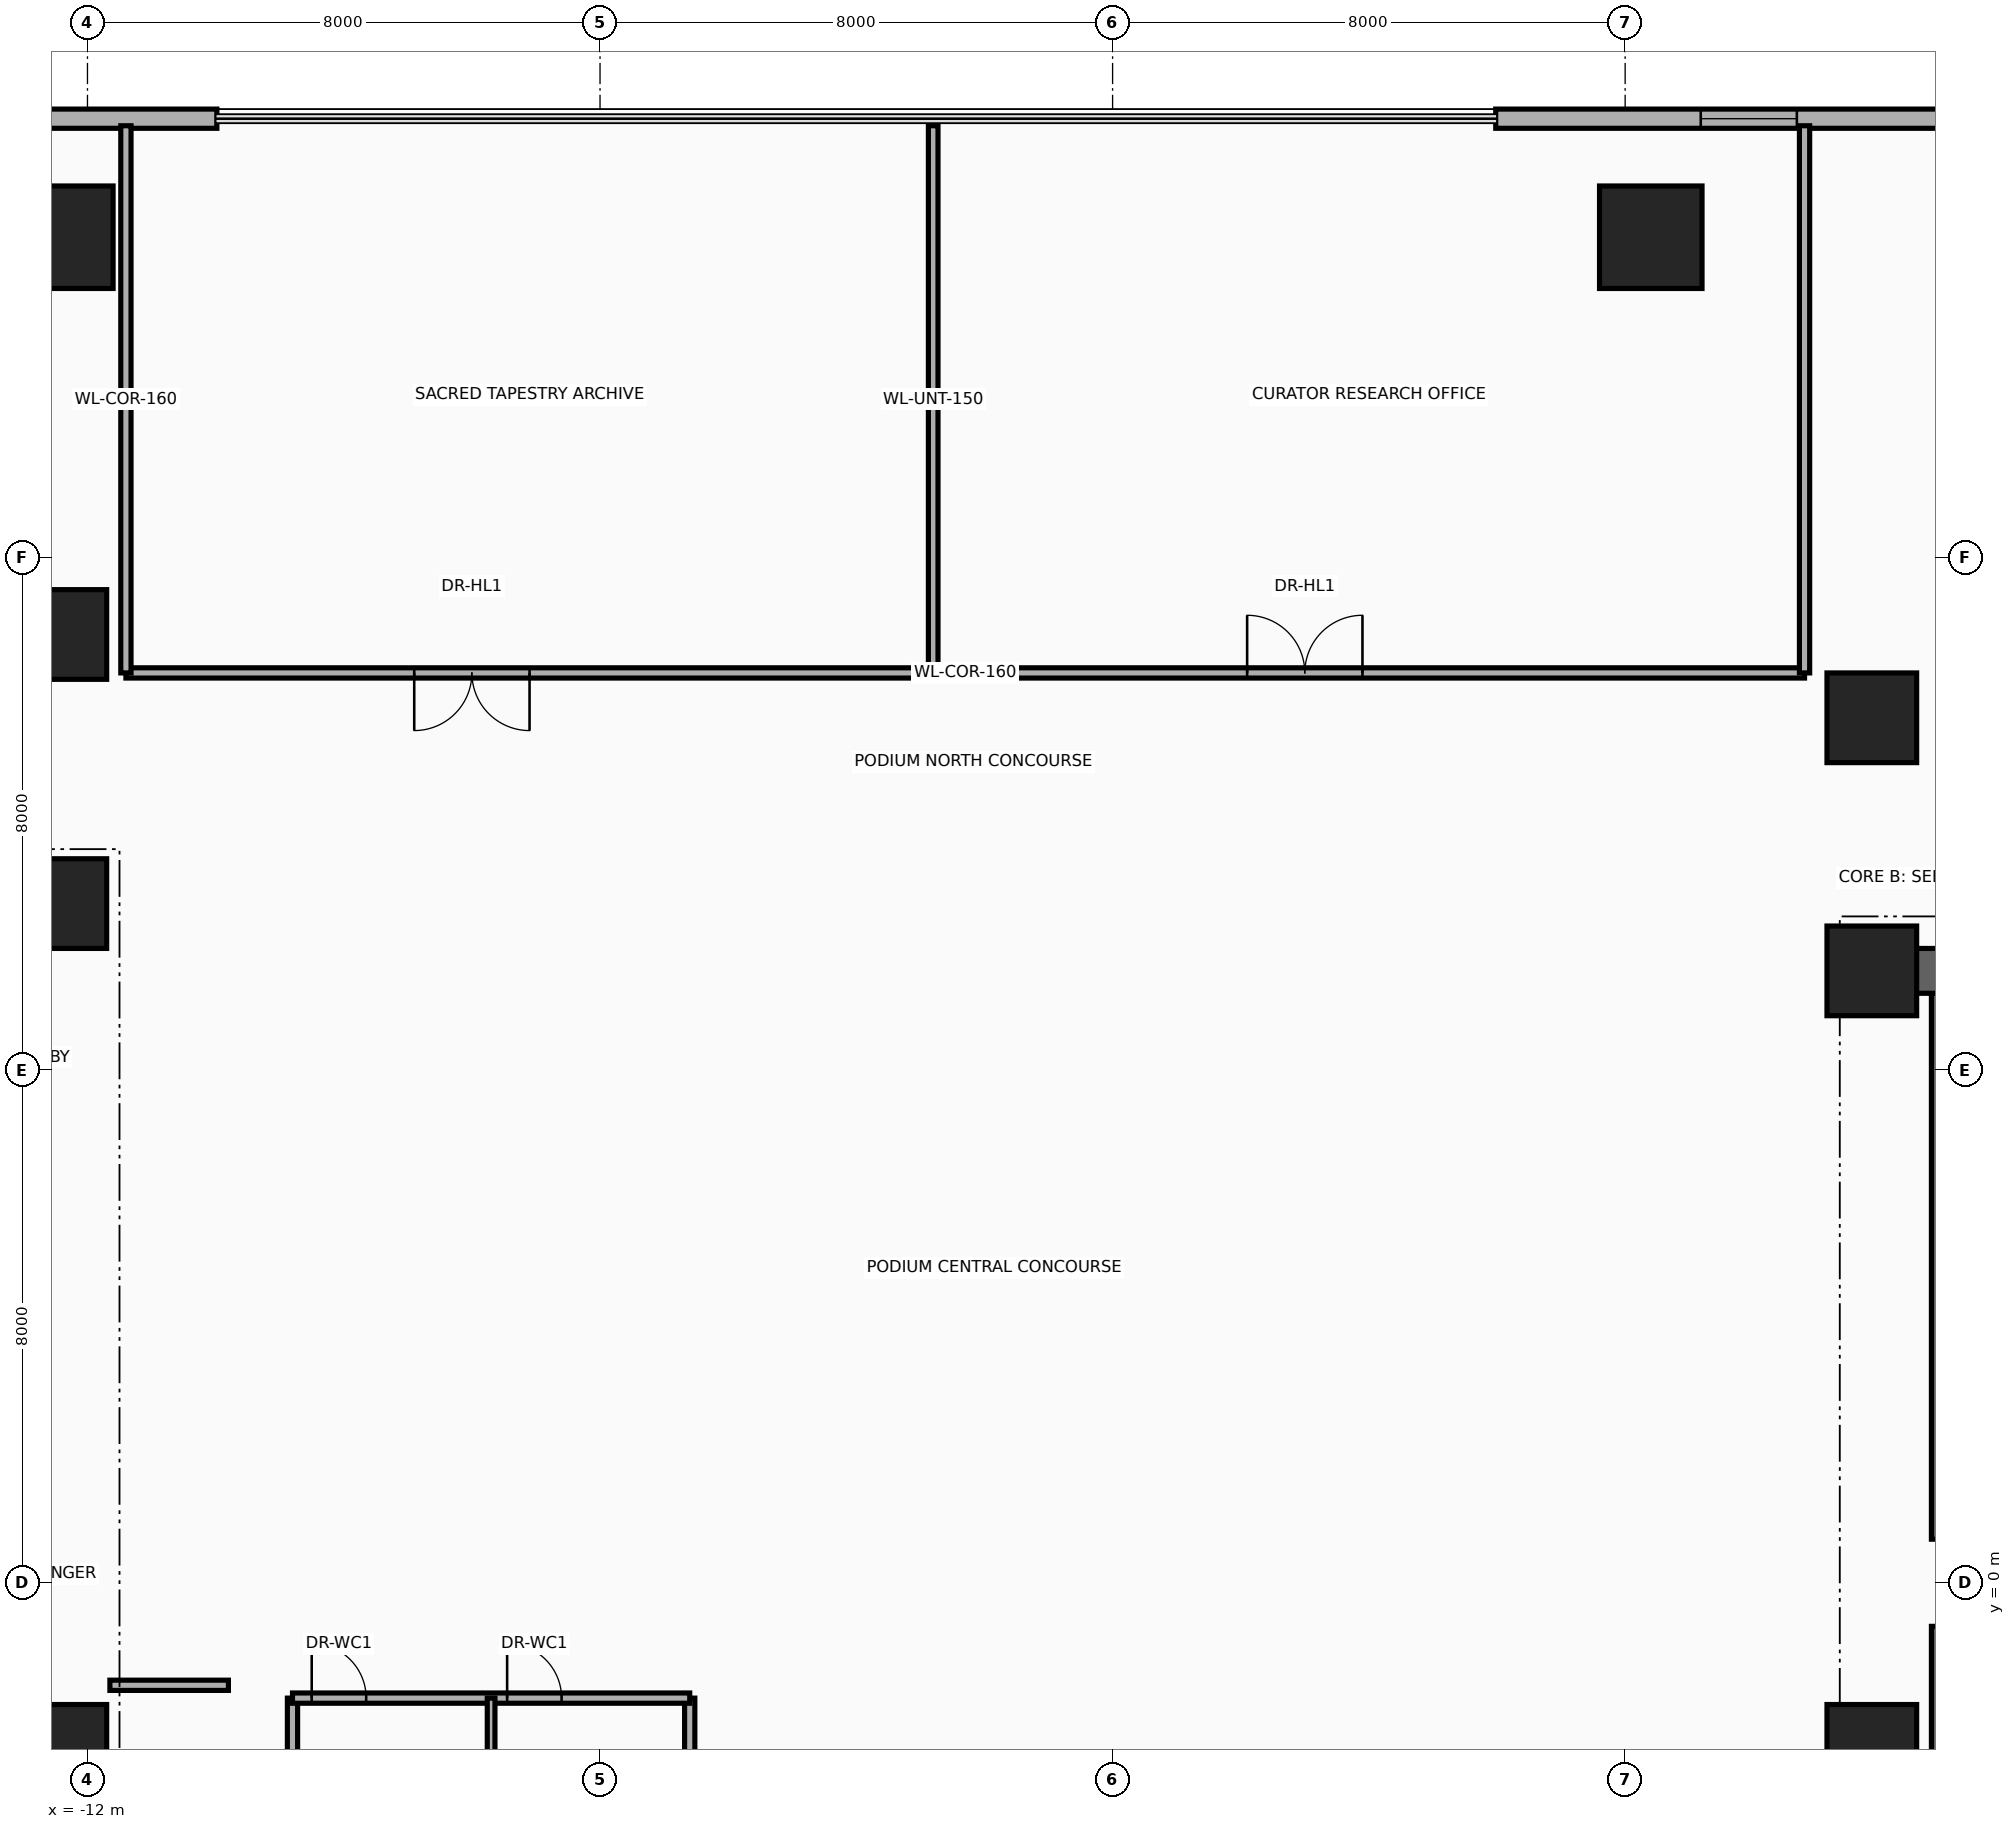
"""IFC4 building model, lengths in metres.
Left out: names, types, materials, properties, quantities, classifications, styles, units other than length and angle.
Written with IfcOpenShell. Run it as: python <this file> out.ifc"""

import sys

from ifc_helpers import new_model, si_unit, direction, frame, frame_2d, origin, origin_2d, place, context, subcontext, project, spatial, rectangle, extrude, source, transform, mapped, element, fill, save


model = new_model("IFC4")
c1 = context("Model", 3, precision=1e-05, world=origin(), true_north=direction((0.0, 1.0)))
c2 = subcontext(c1, "Body", "Model", "MODEL_VIEW")
j1 = project(units=[si_unit("LENGTHUNIT", "METRE"), si_unit("PLANEANGLEUNIT", "RADIAN")], contexts=[c1])
p1 = place(None, origin())
s1 = spatial("IfcSite", under=j1, at=p1, CompositionType="ELEMENT")
p2 = place(p1, origin())
s2 = spatial("IfcBuilding", under=s1, at=p2, CompositionType="ELEMENT")
p3 = place(p2, frame((0.0, 0.0, 15.6)))
s3 = spatial("IfcBuildingStorey", under=s2, at=p3, CompositionType="ELEMENT", Elevation=15.6)
for number, where, z_axis, x_axis in (
    (1, (16.89, 0.68, 0.0), (0.0, 0.0, 1.0), (0.0, 1.0, 0.0)),
    (2, (16.89, -9.2, 0.0), (0.0, 0.0, 1.0), (0.0, 1.0, 0.0)),
):
    element("IfcWall", number, at=place(p3, frame(where, z_axis=z_axis, x_axis=x_axis)), inside=s3, PredefinedType="SHEAR", context=c2, shape_type="SweptSolid", body=[
        extrude(rectangle(XDim=8.52, YDim=0.22, at=frame_2d((4.26, 0.0))), origin(), (0.0, 0.0, 1.0), 4.8),
    ])
p4 = place(p3, frame((-22.65, 10.8, 0.0), z_axis=(0.0, 0.0, 1.0), x_axis=(1.0, 0.0, 0.0)))
e3 = element("IfcWall", 3, at=p4, inside=s3, PredefinedType="SHEAR", context=c2, shape_type="SweptSolid", body=[
    extrude(rectangle(XDim=10.25, YDim=0.7, at=frame_2d((5.125, 0.0))), origin(), (0.0, 0.0, 1.0), 4.8),
])
p5 = place(p3, frame((15.85, 9.55, 0.0), z_axis=(0.0, 0.0, 1.0), x_axis=(1.0, 0.0, 0.0)))
e4 = element("IfcWall", 4, at=p5, inside=s3, PredefinedType="SHEAR", context=c2, shape_type="SweptSolid", body=[
    extrude(rectangle(XDim=9.0, YDim=0.7, at=frame_2d((4.5, 0.0))), origin(), (0.0, 0.0, 1.0), 4.8),
])
m1 = source(origin(), c2, "Body", "SweptSolid", [
    extrude(rectangle(XDim=1.4, YDim=1.4, at=origin_2d()), origin(), (0.0, 0.0, 1.0), 5.2),
])
for number, where, z_axis, x_axis in (
    (5, (-12.4, -2.6, 0.0), (0.0, 0.0, 1.0), (1.0, 0.0, 0.0)),
    (6, (-12.4, 10.6, 0.0), (0.0, 0.0, 1.0), (1.0, 0.0, 0.0)),
    (7, (-12.4, 14.8, 0.0), (0.0, 0.0, 1.0), (1.0, 0.0, 0.0)),
    (8, (15.85, -2.6, 0.0), (0.0, 0.0, 1.0), (1.0, 0.0, 0.0)),
    (9, (15.85, 9.55, 0.0), (0.0, 0.0, 1.0), (1.0, 0.0, 0.0)),
    (10, (15.85, 13.5, 0.0), (0.0, 0.0, 1.0), (1.0, 0.0, 0.0)),
):
    element("IfcColumn", number, at=place(p3, frame(where, z_axis=z_axis, x_axis=x_axis)), inside=s3, PredefinedType="COLUMN", context=c2, shape_type="MappedRepresentation", body=[
        mapped(m1, transform((0.0, 0.0, 0.0), x_axis=(1.0, 0.0, 0.0), y_axis=(0.0, 1.0, 0.0), z_axis=(0.0, 0.0, 1.0), scale=1.0)),
    ])
m2 = source(origin(), c2, "Body", "SweptSolid", [
    extrude(rectangle(XDim=1.6, YDim=1.6, at=origin_2d()), origin(), (0.0, 0.0, 1.0), 5.2),
])
for number, where, z_axis, x_axis in (
    (11, (-12.4, 21.0, 0.0), (0.0, 0.0, 1.0), (1.0, 0.0, 0.0)),
    (12, (12.4, 21.0, 0.0), (0.0, 0.0, 1.0), (1.0, 0.0, 0.0)),
):
    element("IfcColumn", number, at=place(p3, frame(where, z_axis=z_axis, x_axis=x_axis)), inside=s3, PredefinedType="COLUMN", context=c2, shape_type="MappedRepresentation", body=[
        mapped(m2, transform((0.0, 0.0, 0.0), x_axis=(1.0, 0.0, 0.0), y_axis=(0.0, 1.0, 0.0), z_axis=(0.0, 0.0, 1.0), scale=1.0)),
    ])
p6 = place(p3, frame((-33.85, 22.85, 0.0), z_axis=(0.0, 0.0, 1.0), x_axis=(1.0, 0.0, 0.0)))
e13 = element("IfcWall", 13, at=p6, inside=s3, PredefinedType="SOLIDWALL", context=c2, shape_type="SweptSolid", body=[
    extrude(rectangle(XDim=23.87, YDim=0.3, at=frame_2d((11.935, 0.0))), origin(), (0.0, 0.0, 1.0), 4.8),
])
p7 = place(p6, frame((3.2, 0.0, 0.9)))
e14 = element("IfcOpeningElement", 14, at=p7, cuts=e13, PredefinedType="OPENING", context=c2, shape_type="SweptSolid", body=[
    extrude(rectangle(XDim=1.5, YDim=1.75, at=frame_2d((0.75, 0.875))), frame((0.0, 0.165, 0.0), z_axis=(0.0, -1.0, 0.0), x_axis=(1.0, 0.0, 0.0)), (0.0, 0.0, 1.0), 0.33),
])
p8 = place(p6, frame((10.0, 0.0, 0.9)))
e15 = element("IfcOpeningElement", 15, at=p8, cuts=e13, PredefinedType="OPENING", context=c2, shape_type="SweptSolid", body=[
    extrude(rectangle(XDim=1.5, YDim=1.75, at=frame_2d((0.75, 0.875))), frame((0.0, 0.165, 0.0), z_axis=(0.0, -1.0, 0.0), x_axis=(1.0, 0.0, 0.0)), (0.0, 0.0, 1.0), 0.33),
])
p9 = place(p6, frame((17.8, 0.0, 0.9)))
e16 = element("IfcOpeningElement", 16, at=p9, cuts=e13, PredefinedType="OPENING", context=c2, shape_type="SweptSolid", body=[
    extrude(rectangle(XDim=1.5, YDim=1.75, at=frame_2d((0.75, 0.875))), frame((0.0, 0.165, 0.0), z_axis=(0.0, -1.0, 0.0), x_axis=(1.0, 0.0, 0.0)), (0.0, 0.0, 1.0), 0.33),
])
p10 = place(p3, frame((9.98, 22.85, 0.0), z_axis=(0.0, 0.0, 1.0), x_axis=(1.0, 0.0, 0.0)))
e17 = element("IfcWall", 17, at=p10, inside=s3, PredefinedType="SOLIDWALL", context=c2, shape_type="SweptSolid", body=[
    extrude(rectangle(XDim=23.87, YDim=0.3, at=frame_2d((11.935, 0.0))), origin(), (0.0, 0.0, 1.0), 4.8),
])
p11 = place(p10, frame((3.2, 0.0, 0.9)))
e18 = element("IfcOpeningElement", 18, at=p11, cuts=e17, PredefinedType="OPENING", context=c2, shape_type="SweptSolid", body=[
    extrude(rectangle(XDim=1.5, YDim=1.75, at=frame_2d((0.75, 0.875))), frame((0.0, 0.165, 0.0), z_axis=(0.0, -1.0, 0.0), x_axis=(1.0, 0.0, 0.0)), (0.0, 0.0, 1.0), 0.33),
])
p12 = place(p10, frame((10.0, 0.0, 0.9)))
e19 = element("IfcOpeningElement", 19, at=p12, cuts=e17, PredefinedType="OPENING", context=c2, shape_type="SweptSolid", body=[
    extrude(rectangle(XDim=1.5, YDim=1.75, at=frame_2d((0.75, 0.875))), frame((0.0, 0.165, 0.0), z_axis=(0.0, -1.0, 0.0), x_axis=(1.0, 0.0, 0.0)), (0.0, 0.0, 1.0), 0.33),
])
p13 = place(p10, frame((17.8, 0.0, 0.9)))
e20 = element("IfcOpeningElement", 20, at=p13, cuts=e17, PredefinedType="OPENING", context=c2, shape_type="SweptSolid", body=[
    extrude(rectangle(XDim=1.5, YDim=1.75, at=frame_2d((0.75, 0.875))), frame((0.0, 0.165, 0.0), z_axis=(0.0, -1.0, 0.0), x_axis=(1.0, 0.0, 0.0)), (0.0, 0.0, 1.0), 0.33),
])
p14 = place(p3, frame((-11.4, 14.2, 0.0), z_axis=(0.0, 0.0, 1.0), x_axis=(1.0, 0.0, 0.0)))
e21 = element("IfcWall", 21, at=p14, inside=s3, PredefinedType="PARTITIONING", context=c2, shape_type="SweptSolid", body=[
    extrude(rectangle(XDim=26.2, YDim=0.16, at=frame_2d((13.1, 0.0))), origin(), (0.0, 0.0, 1.0), 3.285),
])
p15 = place(p14, frame((4.5, 0.0, 0.0)))
e22 = element("IfcOpeningElement", 22, at=p15, cuts=e21, PredefinedType="OPENING", context=c2, shape_type="SweptSolid", body=[
    extrude(rectangle(XDim=1.8, YDim=2.15, at=frame_2d((0.9, 1.075))), frame((0.0, 0.095, 0.0), z_axis=(0.0, -1.0, 0.0), x_axis=(1.0, 0.0, 0.0)), (0.0, 0.0, 1.0), 0.19),
])
p16 = place(p14, frame((17.5, 0.0, 0.0)))
e23 = element("IfcOpeningElement", 23, at=p16, cuts=e21, PredefinedType="OPENING", context=c2, shape_type="SweptSolid", body=[
    extrude(rectangle(XDim=1.8, YDim=2.15, at=frame_2d((0.9, 1.075))), frame((0.0, 0.095, 0.0), z_axis=(0.0, -1.0, 0.0), x_axis=(1.0, 0.0, 0.0)), (0.0, 0.0, 1.0), 0.19),
])
p17 = place(p3, frame((-11.4, 14.2, 0.0), z_axis=(0.0, 0.0, 1.0), x_axis=(0.0, 1.0, 0.0)))
e24 = element("IfcWall", 24, at=p17, inside=s3, PredefinedType="PARTITIONING", context=c2, shape_type="SweptSolid", body=[
    extrude(rectangle(XDim=8.54, YDim=0.16, at=frame_2d((4.27, 0.0))), origin(), (0.0, 0.0, 1.0), 3.285),
])
p18 = place(p3, frame((14.8, 14.2, 0.0), z_axis=(0.0, 0.0, 1.0), x_axis=(0.0, 1.0, 0.0)))
e25 = element("IfcWall", 25, at=p18, inside=s3, PredefinedType="PARTITIONING", context=c2, shape_type="SweptSolid", body=[
    extrude(rectangle(XDim=8.54, YDim=0.16, at=frame_2d((4.27, 0.0))), origin(), (0.0, 0.0, 1.0), 3.837),
])
p19 = place(p3, frame((1.2, 14.2, 0.0), z_axis=(0.0, 0.0, 1.0), x_axis=(0.0, 1.0, 0.0)))
e26 = element("IfcWall", 26, at=p19, inside=s3, PredefinedType="PARTITIONING", context=c2, shape_type="SweptSolid", body=[
    extrude(rectangle(XDim=8.54, YDim=0.15, at=frame_2d((4.27, 0.0))), origin(), (0.0, 0.0, 1.0), 3.285),
])
for number, where, z_axis, x_axis in (
    (27, (-8.8, -5.2, 0.0), (0.0, 0.0, 1.0), (0.0, 1.0, 0.0)),
    (28, (-2.6, -5.2, 0.0), (0.0, 0.0, 1.0), (0.0, 1.0, 0.0)),
):
    element("IfcWall", number, at=place(p3, frame(where, z_axis=z_axis, x_axis=x_axis)), inside=s3, PredefinedType="PARTITIONING", context=c2, shape_type="SweptSolid", body=[
        extrude(rectangle(XDim=3.4, YDim=0.16, at=frame_2d((1.7, 0.0))), origin(), (0.0, 0.0, 1.0), 4.8),
    ])
p20 = place(p3, frame((-8.8, -1.8, 0.0), z_axis=(0.0, 0.0, 1.0), x_axis=(1.0, 0.0, 0.0)))
e29 = element("IfcWall", 29, at=p20, inside=s3, PredefinedType="PARTITIONING", context=c2, shape_type="SweptSolid", body=[
    extrude(rectangle(XDim=6.2, YDim=0.16, at=frame_2d((3.1, 0.0))), origin(), (0.0, 0.0, 1.0), 4.8),
])
p21 = place(p20, frame((0.3, 0.0, 0.0)))
e30 = element("IfcOpeningElement", 30, at=p21, cuts=e29, PredefinedType="OPENING", context=c2, shape_type="SweptSolid", body=[
    extrude(rectangle(XDim=0.85, YDim=2.1, at=frame_2d((0.425, 1.05))), frame((0.0, 0.095, 0.0), z_axis=(0.0, -1.0, 0.0), x_axis=(1.0, 0.0, 0.0)), (0.0, 0.0, 1.0), 0.19),
])
p22 = place(p20, frame((3.35, 0.0, 0.0)))
e31 = element("IfcOpeningElement", 31, at=p22, cuts=e29, PredefinedType="OPENING", context=c2, shape_type="SweptSolid", body=[
    extrude(rectangle(XDim=0.85, YDim=2.1, at=frame_2d((0.425, 1.05))), frame((0.0, 0.095, 0.0), z_axis=(0.0, -1.0, 0.0), x_axis=(1.0, 0.0, 0.0)), (0.0, 0.0, 1.0), 0.19),
])
p23 = place(p3, frame((-5.7, -5.2, 0.0), z_axis=(0.0, 0.0, 1.0), x_axis=(0.0, 1.0, 0.0)))
e32 = element("IfcWall", 32, at=p23, inside=s3, PredefinedType="PARTITIONING", context=c2, shape_type="SweptSolid", body=[
    extrude(rectangle(XDim=3.4, YDim=0.12, at=frame_2d((1.7, 0.0))), origin(), (0.0, 0.0, 1.0), 4.8),
])
p24 = place(p3, frame((-11.65, -1.6, 0.0), z_axis=(0.0, 0.0, 1.0), x_axis=(1.0, 0.0, 0.0)))
e33 = element("IfcWall", 33, at=p24, inside=s3, PredefinedType="PARTITIONING", context=c2, shape_type="SweptSolid", body=[
    extrude(rectangle(XDim=1.85, YDim=0.16, at=frame_2d((0.925, 0.0))), origin(), (0.0, 0.0, 1.0), 4.8),
])
p25 = place(p11, origin())
e34 = element("IfcWindow", 34, at=p25, inside=s3, PartitioningType="SINGLE_PANEL", PredefinedType="WINDOW", context=c2, shape_type="SweptSolid", body=[
    extrude(rectangle(XDim=1.5, YDim=1.75, at=frame_2d((0.75, 0.875))), frame((0.0, 0.03, 0.0), z_axis=(0.0, -1.0, 0.0), x_axis=(1.0, 0.0, 0.0)), (0.0, 0.0, 1.0), 0.06),
])
fill(e18, e34)
p26 = place(p15, frame((1.8, 0.0, 0.0), z_axis=(0.0, 0.0, 1.0), x_axis=(-1.0, 0.0, 0.0)))
e35 = element("IfcDoor", 35, at=p26, inside=s3, OperationType="DOUBLE_DOOR_SINGLE_SWING", PredefinedType="DOOR", context=c2, shape_type="SweptSolid", body=[
    extrude(rectangle(XDim=1.8, YDim=2.15, at=frame_2d((0.9, 1.075))), frame((0.0, 0.025, 0.0), z_axis=(0.0, -1.0, 0.0), x_axis=(1.0, 0.0, 0.0)), (0.0, 0.0, 1.0), 0.05),
])
fill(e22, e35)
p27 = place(p16, origin())
e36 = element("IfcDoor", 36, at=p27, inside=s3, OperationType="DOUBLE_DOOR_SINGLE_SWING", PredefinedType="DOOR", context=c2, shape_type="SweptSolid", body=[
    extrude(rectangle(XDim=1.8, YDim=2.15, at=frame_2d((0.9, 1.075))), frame((0.0, 0.025, 0.0), z_axis=(0.0, -1.0, 0.0), x_axis=(1.0, 0.0, 0.0)), (0.0, 0.0, 1.0), 0.05),
])
fill(e23, e36)
p28 = place(p21, origin())
e37 = element("IfcDoor", 37, at=p28, inside=s3, OperationType="SINGLE_SWING_LEFT", PredefinedType="DOOR", context=c2, shape_type="SweptSolid", body=[
    extrude(rectangle(XDim=0.85, YDim=2.1, at=frame_2d((0.425, 1.05))), frame((0.0, 0.025, 0.0), z_axis=(0.0, -1.0, 0.0), x_axis=(1.0, 0.0, 0.0)), (0.0, 0.0, 1.0), 0.05),
])
fill(e30, e37)
p29 = place(p22, origin())
e38 = element("IfcDoor", 38, at=p29, inside=s3, OperationType="SINGLE_SWING_RIGHT", PredefinedType="DOOR", context=c2, shape_type="SweptSolid", body=[
    extrude(rectangle(XDim=0.85, YDim=2.1, at=frame_2d((0.425, 1.05))), frame((0.0, 0.025, 0.0), z_axis=(0.0, -1.0, 0.0), x_axis=(1.0, 0.0, 0.0)), (0.0, 0.0, 1.0), 0.05),
])
fill(e31, e38)
save(model, sys.argv[1])
